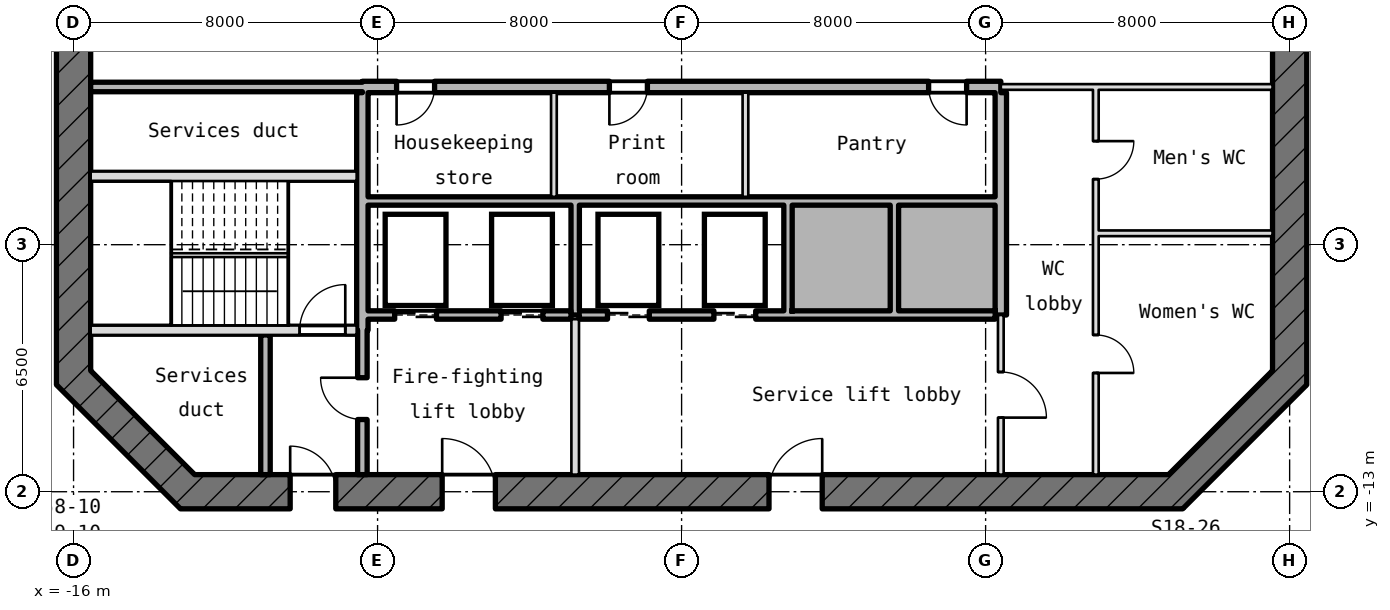
"""IFC4 building model, lengths in metres.
Left out: names, types, materials, properties, quantities, classifications, styles, units other than length and angle.
Written with IfcOpenShell. Run it as: python <this file> out.ifc"""

import sys

from ifc_helpers import new_model, si_unit, direction, frame, frame_2d, origin, place, context, subcontext, project, spatial, rectangle, extrude, element, fill, save


model = new_model("IFC4")
c1 = context("Model", 3, precision=1e-05, world=origin(), true_north=direction((0.0, 1.0)))
c2 = subcontext(c1, "Body", "Model", "MODEL_VIEW")
j1 = project(units=[si_unit("LENGTHUNIT", "METRE"), si_unit("PLANEANGLEUNIT", "RADIAN")], contexts=[c1])
p1 = place(None, origin())
s1 = spatial("IfcSite", under=j1, at=p1, CompositionType="ELEMENT")
p2 = place(p1, origin())
s2 = spatial("IfcBuilding", under=s1, at=p2, CompositionType="ELEMENT")
p3 = place(p2, frame((0.0, 0.0, 260.65)))
s3 = spatial("IfcBuildingStorey", under=s2, at=p3, CompositionType="ELEMENT", Elevation=260.65)
p4 = place(p3, frame((12.868, -13.132, -0.18), z_axis=(0.0, 0.0, 1.0), x_axis=(0.707106781187, 0.707106781187, 0.0)))
e1 = element("IfcWall", 1, at=p4, inside=s3, PredefinedType="SHEAR", context=c2, shape_type="SweptSolid", body=[
    extrude(rectangle(XDim=4.615, YDim=0.9, at=frame_2d((2.308, 0.0))), origin(), (0.0, 0.0, 1.0), 4.15),
])
p5 = place(p3, frame((16.0, -10.186, -0.18), z_axis=(0.0, 0.0, 1.0), x_axis=(0.0, 1.0, 0.0)))
e2 = element("IfcWall", 2, at=p5, inside=s3, PredefinedType="SHEAR", context=c2, shape_type="SweptSolid", body=[
    extrude(rectangle(XDim=20.373, YDim=0.9, at=frame_2d((10.186, 0.0))), origin(), (0.0, 0.0, 1.0), 4.15),
])
p6 = place(p5, frame((8.986, 0.0, 0.18)))
e3 = element("IfcOpeningElement", 3, at=p6, cuts=e2, PredefinedType="OPENING", context=c2, shape_type="SweptSolid", body=[
    extrude(rectangle(XDim=2.4, YDim=2.1, at=frame_2d((1.2, 1.05))), frame((0.0, 0.46, 0.0), z_axis=(0.0, -1.0, 0.0), x_axis=(1.0, 0.0, 0.0)), (0.0, 0.0, 1.0), 0.92),
])
p7 = place(p5, frame((13.586, 0.0, 0.18)))
e4 = element("IfcOpeningElement", 4, at=p7, cuts=e2, PredefinedType="OPENING", context=c2, shape_type="SweptSolid", body=[
    extrude(rectangle(XDim=1.2, YDim=2.1, at=frame_2d((0.6, 1.05))), frame((0.0, 0.46, 0.0), z_axis=(0.0, -1.0, 0.0), x_axis=(1.0, 0.0, 0.0)), (0.0, 0.0, 1.0), 0.92),
])
p8 = place(p3, frame((-16.0, 10.186, -0.18), z_axis=(0.0, 0.0, 1.0), x_axis=(0.0, -1.0, 0.0)))
e5 = element("IfcWall", 5, at=p8, inside=s3, PredefinedType="SHEAR", context=c2, shape_type="SweptSolid", body=[
    extrude(rectangle(XDim=20.373, YDim=0.9, at=frame_2d((10.186, 0.0))), origin(), (0.0, 0.0, 1.0), 4.15),
])
p9 = place(p8, frame((8.986, 0.0, 0.18)))
e6 = element("IfcOpeningElement", 6, at=p9, cuts=e5, PredefinedType="OPENING", context=c2, shape_type="SweptSolid", body=[
    extrude(rectangle(XDim=2.4, YDim=2.1, at=frame_2d((1.2, 1.05))), frame((0.0, 0.46, 0.0), z_axis=(0.0, -1.0, 0.0), x_axis=(1.0, 0.0, 0.0)), (0.0, 0.0, 1.0), 0.92),
])
p10 = place(p8, frame((5.586, 0.0, 0.18)))
e7 = element("IfcOpeningElement", 7, at=p10, cuts=e5, PredefinedType="OPENING", context=c2, shape_type="SweptSolid", body=[
    extrude(rectangle(XDim=1.2, YDim=2.1, at=frame_2d((0.6, 1.05))), frame((0.0, 0.46, 0.0), z_axis=(0.0, -1.0, 0.0), x_axis=(1.0, 0.0, 0.0)), (0.0, 0.0, 1.0), 0.92),
])
p11 = place(p3, frame((-16.132, -9.868, -0.18), z_axis=(0.0, 0.0, 1.0), x_axis=(0.707106781187, -0.707106781187, 0.0)))
e8 = element("IfcWall", 8, at=p11, inside=s3, PredefinedType="SHEAR", context=c2, shape_type="SweptSolid", body=[
    extrude(rectangle(XDim=4.615, YDim=0.9, at=frame_2d((2.308, 0.0))), origin(), (0.0, 0.0, 1.0), 4.15),
])
p12 = place(p3, frame((-13.186, -13.0, -0.18), z_axis=(0.0, 0.0, 1.0), x_axis=(1.0, 0.0, 0.0)))
e9 = element("IfcWall", 9, at=p12, inside=s3, PredefinedType="SHEAR", context=c2, shape_type="SweptSolid", body=[
    extrude(rectangle(XDim=26.373, YDim=0.9, at=frame_2d((13.186, 0.0))), origin(), (0.0, 0.0, 1.0), 4.15),
])
p13 = place(p12, frame((2.886, 0.0, 0.18)))
e10 = element("IfcOpeningElement", 10, at=p13, cuts=e9, PredefinedType="OPENING", context=c2, shape_type="SweptSolid", body=[
    extrude(rectangle(XDim=1.2, YDim=2.1, at=frame_2d((0.6, 1.05))), frame((0.0, 0.46, 0.0), z_axis=(0.0, -1.0, 0.0), x_axis=(1.0, 0.0, 0.0)), (0.0, 0.0, 1.0), 0.92),
])
p14 = place(p12, frame((6.886, 0.0, 0.18)))
e11 = element("IfcOpeningElement", 11, at=p14, cuts=e9, PredefinedType="OPENING", context=c2, shape_type="SweptSolid", body=[
    extrude(rectangle(XDim=1.4, YDim=2.1, at=frame_2d((0.7, 1.05))), frame((0.0, 0.46, 0.0), z_axis=(0.0, -1.0, 0.0), x_axis=(1.0, 0.0, 0.0)), (0.0, 0.0, 1.0), 0.92),
])
p15 = place(p12, frame((15.486, 0.0, 0.18)))
e12 = element("IfcOpeningElement", 12, at=p15, cuts=e9, PredefinedType="OPENING", context=c2, shape_type="SweptSolid", body=[
    extrude(rectangle(XDim=1.4, YDim=2.1, at=frame_2d((0.7, 1.05))), frame((0.0, 0.46, 0.0), z_axis=(0.0, -1.0, 0.0), x_axis=(1.0, 0.0, 0.0)), (0.0, 0.0, 1.0), 0.92),
])
p16 = place(p3, frame((-15.55, -8.75, -0.18), z_axis=(0.0, 0.0, 1.0), x_axis=(1.0, 0.0, 0.0)))
e13 = element("IfcWall", 13, at=p16, inside=s3, PredefinedType="SHEAR", context=c2, shape_type="SweptSolid", body=[
    extrude(rectangle(XDim=7.0, YDim=0.25, at=frame_2d((3.5, 0.0))), origin(), (0.0, 0.0, 1.0), 4.15),
])
p17 = place(p16, frame((5.5, 0.0, 0.18)))
e14 = element("IfcOpeningElement", 14, at=p17, cuts=e13, PredefinedType="OPENING", context=c2, shape_type="SweptSolid", body=[
    extrude(rectangle(XDim=1.2, YDim=2.1, at=frame_2d((0.6, 1.05))), frame((0.0, 0.135, 0.0), z_axis=(0.0, -1.0, 0.0), x_axis=(1.0, 0.0, 0.0)), (0.0, 0.0, 1.0), 0.27),
])
p18 = place(p3, frame((-8.25, -8.35, 0.0), z_axis=(0.0, 0.0, 1.0), x_axis=(1.0, 0.0, 0.0)))
e15 = element("IfcWall", 15, at=p18, inside=s3, PredefinedType="STANDARD", context=c2, shape_type="SweptSolid", body=[
    extrude(rectangle(XDim=5.34, YDim=0.22, at=frame_2d((2.67, 0.0))), origin(), (0.0, 0.0, 1.0), 3.97),
])
p19 = place(p18, frame((0.7, 0.0, 0.0)))
e16 = element("IfcOpeningElement", 16, at=p19, cuts=e15, PredefinedType="OPENING", context=c2, shape_type="SweptSolid", body=[
    extrude(rectangle(XDim=1.1, YDim=2.1, at=frame_2d((0.55, 1.05))), frame((0.0, 0.12, 0.0), z_axis=(0.0, -1.0, 0.0), x_axis=(1.0, 0.0, 0.0)), (0.0, 0.0, 1.0), 0.24),
])
p20 = place(p18, frame((3.5, 0.0, 0.0)))
e17 = element("IfcOpeningElement", 17, at=p20, cuts=e15, PredefinedType="OPENING", context=c2, shape_type="SweptSolid", body=[
    extrude(rectangle(XDim=1.1, YDim=2.1, at=frame_2d((0.55, 1.05))), frame((0.0, 0.12, 0.0), z_axis=(0.0, -1.0, 0.0), x_axis=(1.0, 0.0, 0.0)), (0.0, 0.0, 1.0), 0.24),
])
p21 = place(p3, frame((-2.69, -8.35, 0.0), z_axis=(0.0, 0.0, 1.0), x_axis=(1.0, 0.0, 0.0)))
e18 = element("IfcWall", 18, at=p21, inside=s3, PredefinedType="STANDARD", context=c2, shape_type="SweptSolid", body=[
    extrude(rectangle(XDim=10.94, YDim=0.22, at=frame_2d((5.47, 0.0))), origin(), (0.0, 0.0, 1.0), 3.97),
])
p22 = place(p21, frame((0.74, 0.0, 0.0)))
e19 = element("IfcOpeningElement", 19, at=p22, cuts=e18, PredefinedType="OPENING", context=c2, shape_type="SweptSolid", body=[
    extrude(rectangle(XDim=1.1, YDim=2.1, at=frame_2d((0.55, 1.05))), frame((0.0, 0.12, 0.0), z_axis=(0.0, -1.0, 0.0), x_axis=(1.0, 0.0, 0.0)), (0.0, 0.0, 1.0), 0.24),
])
p23 = place(p21, frame((3.54, 0.0, 0.0)))
e20 = element("IfcOpeningElement", 20, at=p23, cuts=e18, PredefinedType="OPENING", context=c2, shape_type="SweptSolid", body=[
    extrude(rectangle(XDim=1.1, YDim=2.1, at=frame_2d((0.55, 1.05))), frame((0.0, 0.12, 0.0), z_axis=(0.0, -1.0, 0.0), x_axis=(1.0, 0.0, 0.0)), (0.0, 0.0, 1.0), 0.24),
])
p24 = place(p3, frame((10.975, -6.2, 0.0), z_axis=(0.0, 0.0, 1.0), x_axis=(1.0, 0.0, 0.0)))
e21 = element("IfcWall", 21, at=p24, inside=s3, PredefinedType="PARTITIONING", context=c2, shape_type="SweptSolid", body=[
    extrude(rectangle(XDim=4.575, YDim=0.15, at=frame_2d((2.288, 0.0))), origin(), (0.0, 0.0, 1.0), 3.97),
])
p25 = place(p3, frame((-8.25, -5.35, 0.0), z_axis=(0.0, 0.0, 1.0), x_axis=(1.0, 0.0, 0.0)))
e22 = element("IfcWall", 22, at=p25, inside=s3, PredefinedType="STANDARD", context=c2, shape_type="SweptSolid", body=[
    extrude(rectangle(XDim=16.5, YDim=0.22, at=frame_2d((8.25, 0.0))), origin(), (0.0, 0.0, 1.0), 3.97),
])
p26 = place(p3, frame((-15.55, -4.7, -0.18), z_axis=(0.0, 0.0, 1.0), x_axis=(1.0, 0.0, 0.0)))
e23 = element("IfcWall", 23, at=p26, inside=s3, PredefinedType="SHEAR", context=c2, shape_type="SweptSolid", body=[
    extrude(rectangle(XDim=7.0, YDim=0.25, at=frame_2d((3.5, 0.0))), origin(), (0.0, 0.0, 1.0), 4.15),
])
p27 = place(p3, frame((-15.55, -2.35, 0.0), z_axis=(0.0, 0.0, 1.0), x_axis=(1.0, 0.0, 0.0)))
e24 = element("IfcWall", 24, at=p27, inside=s3, PredefinedType="STANDARD", context=c2, shape_type="SweptSolid", body=[
    extrude(rectangle(XDim=7.15, YDim=0.25, at=frame_2d((3.575, 0.0))), origin(), (0.0, 0.0, 1.0), 3.97),
])
p28 = place(p3, frame((-8.4, -2.35, -0.18), z_axis=(0.0, 0.0, 1.0), x_axis=(1.0, 0.0, 0.0)))
e25 = element("IfcWall", 25, at=p28, inside=s3, PredefinedType="SHEAR", context=c2, shape_type="SweptSolid", body=[
    extrude(rectangle(XDim=16.8, YDim=0.3, at=frame_2d((8.4, 0.0))), origin(), (0.0, 0.0, 1.0), 4.15),
])
p29 = place(p28, frame((0.9, 0.0, 0.18)))
e26 = element("IfcOpeningElement", 26, at=p29, cuts=e25, PredefinedType="OPENING", context=c2, shape_type="SweptSolid", body=[
    extrude(rectangle(XDim=1.0, YDim=2.1, at=frame_2d((0.5, 1.05))), frame((0.0, 0.16, 0.0), z_axis=(0.0, -1.0, 0.0), x_axis=(1.0, 0.0, 0.0)), (0.0, 0.0, 1.0), 0.32),
])
p30 = place(p28, frame((6.5, 0.0, 0.18)))
e27 = element("IfcOpeningElement", 27, at=p30, cuts=e25, PredefinedType="OPENING", context=c2, shape_type="SweptSolid", body=[
    extrude(rectangle(XDim=1.0, YDim=2.1, at=frame_2d((0.5, 1.05))), frame((0.0, 0.16, 0.0), z_axis=(0.0, -1.0, 0.0), x_axis=(1.0, 0.0, 0.0)), (0.0, 0.0, 1.0), 0.32),
])
p31 = place(p28, frame((14.9, 0.0, 0.18)))
e28 = element("IfcOpeningElement", 28, at=p31, cuts=e25, PredefinedType="OPENING", context=c2, shape_type="SweptSolid", body=[
    extrude(rectangle(XDim=1.0, YDim=2.1, at=frame_2d((0.5, 1.05))), frame((0.0, 0.16, 0.0), z_axis=(0.0, -1.0, 0.0), x_axis=(1.0, 0.0, 0.0)), (0.0, 0.0, 1.0), 0.32),
])
p32 = place(p3, frame((8.4, -2.35, 0.0), z_axis=(0.0, 0.0, 1.0), x_axis=(1.0, 0.0, 0.0)))
e29 = element("IfcWall", 29, at=p32, inside=s3, PredefinedType="PARTITIONING", context=c2, shape_type="SweptSolid", body=[
    extrude(rectangle(XDim=7.15, YDim=0.15, at=frame_2d((3.575, 0.0))), origin(), (0.0, 0.0, 1.0), 3.97),
])
p33 = place(p3, frame((-10.95, -12.55, 0.0), z_axis=(0.0, 0.0, 1.0), x_axis=(0.0, 1.0, 0.0)))
e30 = element("IfcWall", 30, at=p33, inside=s3, PredefinedType="STANDARD", context=c2, shape_type="SweptSolid", body=[
    extrude(rectangle(XDim=3.675, YDim=0.25, at=frame_2d((1.837, 0.0))), origin(), (0.0, 0.0, 1.0), 3.97),
])
p34 = place(p3, frame((-8.4, -12.55, 0.0), z_axis=(0.0, 0.0, 1.0), x_axis=(0.0, 1.0, 0.0)))
e31 = element("IfcWall", 31, at=p34, inside=s3, PredefinedType="STANDARD", context=c2, shape_type="SweptSolid", body=[
    extrude(rectangle(XDim=3.8, YDim=0.25, at=frame_2d((1.9, 0.0))), origin(), (0.0, 0.0, 1.0), 3.97),
])
p35 = place(p34, frame((1.45, 0.0, 0.0)))
e32 = element("IfcOpeningElement", 32, at=p35, cuts=e31, PredefinedType="OPENING", context=c2, shape_type="SweptSolid", body=[
    extrude(rectangle(XDim=1.1, YDim=2.1, at=frame_2d((0.55, 1.05))), frame((0.0, 0.135, 0.0), z_axis=(0.0, -1.0, 0.0), x_axis=(1.0, 0.0, 0.0)), (0.0, 0.0, 1.0), 0.27),
])
p36 = place(p3, frame((-8.4, -8.75, -0.18), z_axis=(0.0, 0.0, 1.0), x_axis=(0.0, 1.0, 0.0)))
e33 = element("IfcWall", 33, at=p36, inside=s3, PredefinedType="SHEAR", context=c2, shape_type="SweptSolid", body=[
    extrude(rectangle(XDim=6.25, YDim=0.3, at=frame_2d((3.125, 0.0))), origin(), (0.0, 0.0, 1.0), 4.15),
])
p37 = place(p3, frame((-3.36, -5.24, 0.0), z_axis=(0.0, 0.0, 1.0), x_axis=(0.0, 1.0, 0.0)))
e34 = element("IfcWall", 34, at=p37, inside=s3, PredefinedType="PARTITIONING", context=c2, shape_type="SweptSolid", body=[
    extrude(rectangle(XDim=2.74, YDim=0.15, at=frame_2d((1.37, 0.0))), origin(), (0.0, 0.0, 1.0), 3.97),
])
p38 = place(p3, frame((-2.8, -12.55, 0.0), z_axis=(0.0, 0.0, 1.0), x_axis=(0.0, 1.0, 0.0)))
e35 = element("IfcWall", 35, at=p38, inside=s3, PredefinedType="PARTITIONING", context=c2, shape_type="SweptSolid", body=[
    extrude(rectangle(XDim=4.09, YDim=0.2, at=frame_2d((2.045, 0.0))), origin(), (0.0, 0.0, 1.0), 3.97),
])
p39 = place(p3, frame((-2.8, -8.35, 0.0), z_axis=(0.0, 0.0, 1.0), x_axis=(0.0, 1.0, 0.0)))
e36 = element("IfcWall", 36, at=p39, inside=s3, PredefinedType="STANDARD", context=c2, shape_type="SweptSolid", body=[
    extrude(rectangle(XDim=2.89, YDim=0.22, at=frame_2d((1.445, 0.0))), origin(), (0.0, 0.0, 1.0), 3.97),
])
p40 = place(p3, frame((1.68, -5.24, 0.0), z_axis=(0.0, 0.0, 1.0), x_axis=(0.0, 1.0, 0.0)))
e37 = element("IfcWall", 37, at=p40, inside=s3, PredefinedType="PARTITIONING", context=c2, shape_type="SweptSolid", body=[
    extrude(rectangle(XDim=2.74, YDim=0.15, at=frame_2d((1.37, 0.0))), origin(), (0.0, 0.0, 1.0), 3.97),
])
for number, where, z_axis, x_axis in (
    (38, (2.8, -8.24, 0.0), (0.0, 0.0, 1.0), (0.0, 1.0, 0.0)),
    (39, (5.6, -8.24, 0.0), (0.0, 0.0, 1.0), (0.0, 1.0, 0.0)),
):
    element("IfcWall", number, at=place(p3, frame(where, z_axis=z_axis, x_axis=x_axis)), inside=s3, PredefinedType="STANDARD", context=c2, shape_type="SweptSolid", body=[
        extrude(rectangle(XDim=2.78, YDim=0.22, at=frame_2d((1.39, 0.0))), origin(), (0.0, 0.0, 1.0), 3.97),
    ])
p41 = place(p3, frame((8.4, -12.55, 0.0), z_axis=(0.0, 0.0, 1.0), x_axis=(0.0, 1.0, 0.0)))
e40 = element("IfcWall", 40, at=p41, inside=s3, PredefinedType="PARTITIONING", context=c2, shape_type="SweptSolid", body=[
    extrude(rectangle(XDim=4.2, YDim=0.15, at=frame_2d((2.1, 0.0))), origin(), (0.0, 0.0, 1.0), 3.97),
])
p42 = place(p41, frame((1.5, 0.0, 0.0)))
e41 = element("IfcOpeningElement", 41, at=p42, cuts=e40, PredefinedType="OPENING", context=c2, shape_type="SweptSolid", body=[
    extrude(rectangle(XDim=1.2, YDim=2.1, at=frame_2d((0.6, 1.05))), frame((0.0, 0.085, 0.0), z_axis=(0.0, -1.0, 0.0), x_axis=(1.0, 0.0, 0.0)), (0.0, 0.0, 1.0), 0.17),
])
p43 = place(p3, frame((8.4, -8.35, -0.18), z_axis=(0.0, 0.0, 1.0), x_axis=(0.0, 1.0, 0.0)))
e42 = element("IfcWall", 42, at=p43, inside=s3, PredefinedType="SHEAR", context=c2, shape_type="SweptSolid", body=[
    extrude(rectangle(XDim=5.85, YDim=0.3, at=frame_2d((2.925, 0.0))), origin(), (0.0, 0.0, 1.0), 4.15),
])
p44 = place(p3, frame((10.9, -12.55, 0.0), z_axis=(0.0, 0.0, 1.0), x_axis=(0.0, 1.0, 0.0)))
e43 = element("IfcWall", 43, at=p44, inside=s3, PredefinedType="PARTITIONING", context=c2, shape_type="SweptSolid", body=[
    extrude(rectangle(XDim=10.125, YDim=0.15, at=frame_2d((5.062, 0.0))), origin(), (0.0, 0.0, 1.0), 3.97),
])
p45 = place(p44, frame((7.775, 0.0, 0.0)))
e44 = element("IfcOpeningElement", 44, at=p45, cuts=e43, PredefinedType="OPENING", context=c2, shape_type="SweptSolid", body=[
    extrude(rectangle(XDim=1.0, YDim=2.1, at=frame_2d((0.5, 1.05))), frame((0.0, 0.085, 0.0), z_axis=(0.0, -1.0, 0.0), x_axis=(1.0, 0.0, 0.0)), (0.0, 0.0, 1.0), 0.17),
])
p46 = place(p44, frame((2.675, 0.0, 0.0)))
e45 = element("IfcOpeningElement", 45, at=p46, cuts=e43, PredefinedType="OPENING", context=c2, shape_type="SweptSolid", body=[
    extrude(rectangle(XDim=1.0, YDim=2.1, at=frame_2d((0.5, 1.05))), frame((0.0, 0.085, 0.0), z_axis=(0.0, -1.0, 0.0), x_axis=(1.0, 0.0, 0.0)), (0.0, 0.0, 1.0), 0.17),
])
p47 = place(p19, origin())
e46 = element("IfcDoor", 46, at=p47, inside=s3, OperationType="DOUBLE_DOOR_SLIDING", PredefinedType="DOOR", context=c2, shape_type="SweptSolid", body=[
    extrude(rectangle(XDim=1.1, YDim=2.1, at=frame_2d((0.55, 1.05))), frame((0.0, 0.025, 0.0), z_axis=(0.0, -1.0, 0.0), x_axis=(1.0, 0.0, 0.0)), (0.0, 0.0, 1.0), 0.05),
])
fill(e16, e46)
p48 = place(p20, origin())
e47 = element("IfcDoor", 47, at=p48, inside=s3, OperationType="DOUBLE_DOOR_SLIDING", PredefinedType="DOOR", context=c2, shape_type="SweptSolid", body=[
    extrude(rectangle(XDim=1.1, YDim=2.1, at=frame_2d((0.55, 1.05))), frame((0.0, 0.025, 0.0), z_axis=(0.0, -1.0, 0.0), x_axis=(1.0, 0.0, 0.0)), (0.0, 0.0, 1.0), 0.05),
])
fill(e17, e47)
p49 = place(p22, origin())
e48 = element("IfcDoor", 48, at=p49, inside=s3, OperationType="DOUBLE_DOOR_SLIDING", PredefinedType="DOOR", context=c2, shape_type="SweptSolid", body=[
    extrude(rectangle(XDim=1.1, YDim=2.1, at=frame_2d((0.55, 1.05))), frame((0.0, 0.025, 0.0), z_axis=(0.0, -1.0, 0.0), x_axis=(1.0, 0.0, 0.0)), (0.0, 0.0, 1.0), 0.05),
])
fill(e19, e48)
p50 = place(p23, origin())
e49 = element("IfcDoor", 49, at=p50, inside=s3, OperationType="DOUBLE_DOOR_SLIDING", PredefinedType="DOOR", context=c2, shape_type="SweptSolid", body=[
    extrude(rectangle(XDim=1.1, YDim=2.1, at=frame_2d((0.55, 1.05))), frame((0.0, 0.025, 0.0), z_axis=(0.0, -1.0, 0.0), x_axis=(1.0, 0.0, 0.0)), (0.0, 0.0, 1.0), 0.05),
])
fill(e20, e49)
p51 = place(p17, origin())
e50 = element("IfcDoor", 50, at=p51, inside=s3, OperationType="SINGLE_SWING_RIGHT", PredefinedType="DOOR", context=c2, shape_type="SweptSolid", body=[
    extrude(rectangle(XDim=1.2, YDim=2.1, at=frame_2d((0.6, 1.05))), frame((0.0, 0.025, 0.0), z_axis=(0.0, -1.0, 0.0), x_axis=(1.0, 0.0, 0.0)), (0.0, 0.0, 1.0), 0.05),
])
fill(e14, e50)
p52 = place(p35, origin())
e51 = element("IfcDoor", 51, at=p52, inside=s3, OperationType="SINGLE_SWING_RIGHT", PredefinedType="DOOR", context=c2, shape_type="SweptSolid", body=[
    extrude(rectangle(XDim=1.1, YDim=2.1, at=frame_2d((0.55, 1.05))), frame((0.0, 0.025, 0.0), z_axis=(0.0, -1.0, 0.0), x_axis=(1.0, 0.0, 0.0)), (0.0, 0.0, 1.0), 0.05),
])
fill(e32, e51)
p53 = place(p13, origin())
e52 = element("IfcDoor", 52, at=p53, inside=s3, OperationType="SINGLE_SWING_RIGHT", PredefinedType="DOOR", context=c2, shape_type="SweptSolid", body=[
    extrude(rectangle(XDim=1.2, YDim=2.1, at=frame_2d((0.6, 1.05))), frame((0.0, 0.025, 0.0), z_axis=(0.0, -1.0, 0.0), x_axis=(1.0, 0.0, 0.0)), (0.0, 0.0, 1.0), 0.05),
])
fill(e10, e52)
p54 = place(p14, origin())
e53 = element("IfcDoor", 53, at=p54, inside=s3, OperationType="SINGLE_SWING_RIGHT", PredefinedType="DOOR", context=c2, shape_type="SweptSolid", body=[
    extrude(rectangle(XDim=1.4, YDim=2.1, at=frame_2d((0.7, 1.05))), frame((0.0, 0.025, 0.0), z_axis=(0.0, -1.0, 0.0), x_axis=(1.0, 0.0, 0.0)), (0.0, 0.0, 1.0), 0.05),
])
fill(e11, e53)
p55 = place(p15, origin())
e54 = element("IfcDoor", 54, at=p55, inside=s3, OperationType="SINGLE_SWING_RIGHT", PredefinedType="DOOR", context=c2, shape_type="SweptSolid", body=[
    extrude(rectangle(XDim=1.4, YDim=2.1, at=frame_2d((0.7, 1.05))), frame((0.0, 0.025, 0.0), z_axis=(0.0, -1.0, 0.0), x_axis=(1.0, 0.0, 0.0)), (0.0, 0.0, 1.0), 0.05),
])
fill(e12, e54)
p56 = place(p29, frame((1.0, 0.0, 0.0), z_axis=(0.0, 0.0, 1.0), x_axis=(-1.0, 0.0, 0.0)))
e55 = element("IfcDoor", 55, at=p56, inside=s3, OperationType="SINGLE_SWING_LEFT", PredefinedType="DOOR", context=c2, shape_type="SweptSolid", body=[
    extrude(rectangle(XDim=1.0, YDim=2.1, at=frame_2d((0.5, 1.05))), frame((0.0, 0.025, 0.0), z_axis=(0.0, -1.0, 0.0), x_axis=(1.0, 0.0, 0.0)), (0.0, 0.0, 1.0), 0.05),
])
fill(e26, e55)
p57 = place(p30, frame((1.0, 0.0, 0.0), z_axis=(0.0, 0.0, 1.0), x_axis=(-1.0, 0.0, 0.0)))
e56 = element("IfcDoor", 56, at=p57, inside=s3, OperationType="SINGLE_SWING_LEFT", PredefinedType="DOOR", context=c2, shape_type="SweptSolid", body=[
    extrude(rectangle(XDim=1.0, YDim=2.1, at=frame_2d((0.5, 1.05))), frame((0.0, 0.025, 0.0), z_axis=(0.0, -1.0, 0.0), x_axis=(1.0, 0.0, 0.0)), (0.0, 0.0, 1.0), 0.05),
])
fill(e27, e56)
p58 = place(p31, frame((1.0, 0.0, 0.0), z_axis=(0.0, 0.0, 1.0), x_axis=(-1.0, 0.0, 0.0)))
e57 = element("IfcDoor", 57, at=p58, inside=s3, OperationType="SINGLE_SWING_LEFT", PredefinedType="DOOR", context=c2, shape_type="SweptSolid", body=[
    extrude(rectangle(XDim=1.0, YDim=2.1, at=frame_2d((0.5, 1.05))), frame((0.0, 0.025, 0.0), z_axis=(0.0, -1.0, 0.0), x_axis=(1.0, 0.0, 0.0)), (0.0, 0.0, 1.0), 0.05),
])
fill(e28, e57)
p59 = place(p42, frame((1.2, 0.0, 0.0), z_axis=(0.0, 0.0, 1.0), x_axis=(-1.0, 0.0, 0.0)))
e58 = element("IfcDoor", 58, at=p59, inside=s3, OperationType="SINGLE_SWING_LEFT", PredefinedType="DOOR", context=c2, shape_type="SweptSolid", body=[
    extrude(rectangle(XDim=1.2, YDim=2.1, at=frame_2d((0.6, 1.05))), frame((0.0, 0.025, 0.0), z_axis=(0.0, -1.0, 0.0), x_axis=(1.0, 0.0, 0.0)), (0.0, 0.0, 1.0), 0.05),
])
fill(e41, e58)
p60 = place(p45, frame((1.0, 0.0, 0.0), z_axis=(0.0, 0.0, 1.0), x_axis=(-1.0, 0.0, 0.0)))
e59 = element("IfcDoor", 59, at=p60, inside=s3, OperationType="SINGLE_SWING_LEFT", PredefinedType="DOOR", context=c2, shape_type="SweptSolid", body=[
    extrude(rectangle(XDim=1.0, YDim=2.1, at=frame_2d((0.5, 1.05))), frame((0.0, 0.025, 0.0), z_axis=(0.0, -1.0, 0.0), x_axis=(1.0, 0.0, 0.0)), (0.0, 0.0, 1.0), 0.05),
])
fill(e44, e59)
p61 = place(p46, frame((1.0, 0.0, 0.0), z_axis=(0.0, 0.0, 1.0), x_axis=(-1.0, 0.0, 0.0)))
e60 = element("IfcDoor", 60, at=p61, inside=s3, OperationType="SINGLE_SWING_LEFT", PredefinedType="DOOR", context=c2, shape_type="SweptSolid", body=[
    extrude(rectangle(XDim=1.0, YDim=2.1, at=frame_2d((0.5, 1.05))), frame((0.0, 0.025, 0.0), z_axis=(0.0, -1.0, 0.0), x_axis=(1.0, 0.0, 0.0)), (0.0, 0.0, 1.0), 0.05),
])
fill(e45, e60)
save(model, sys.argv[1])
